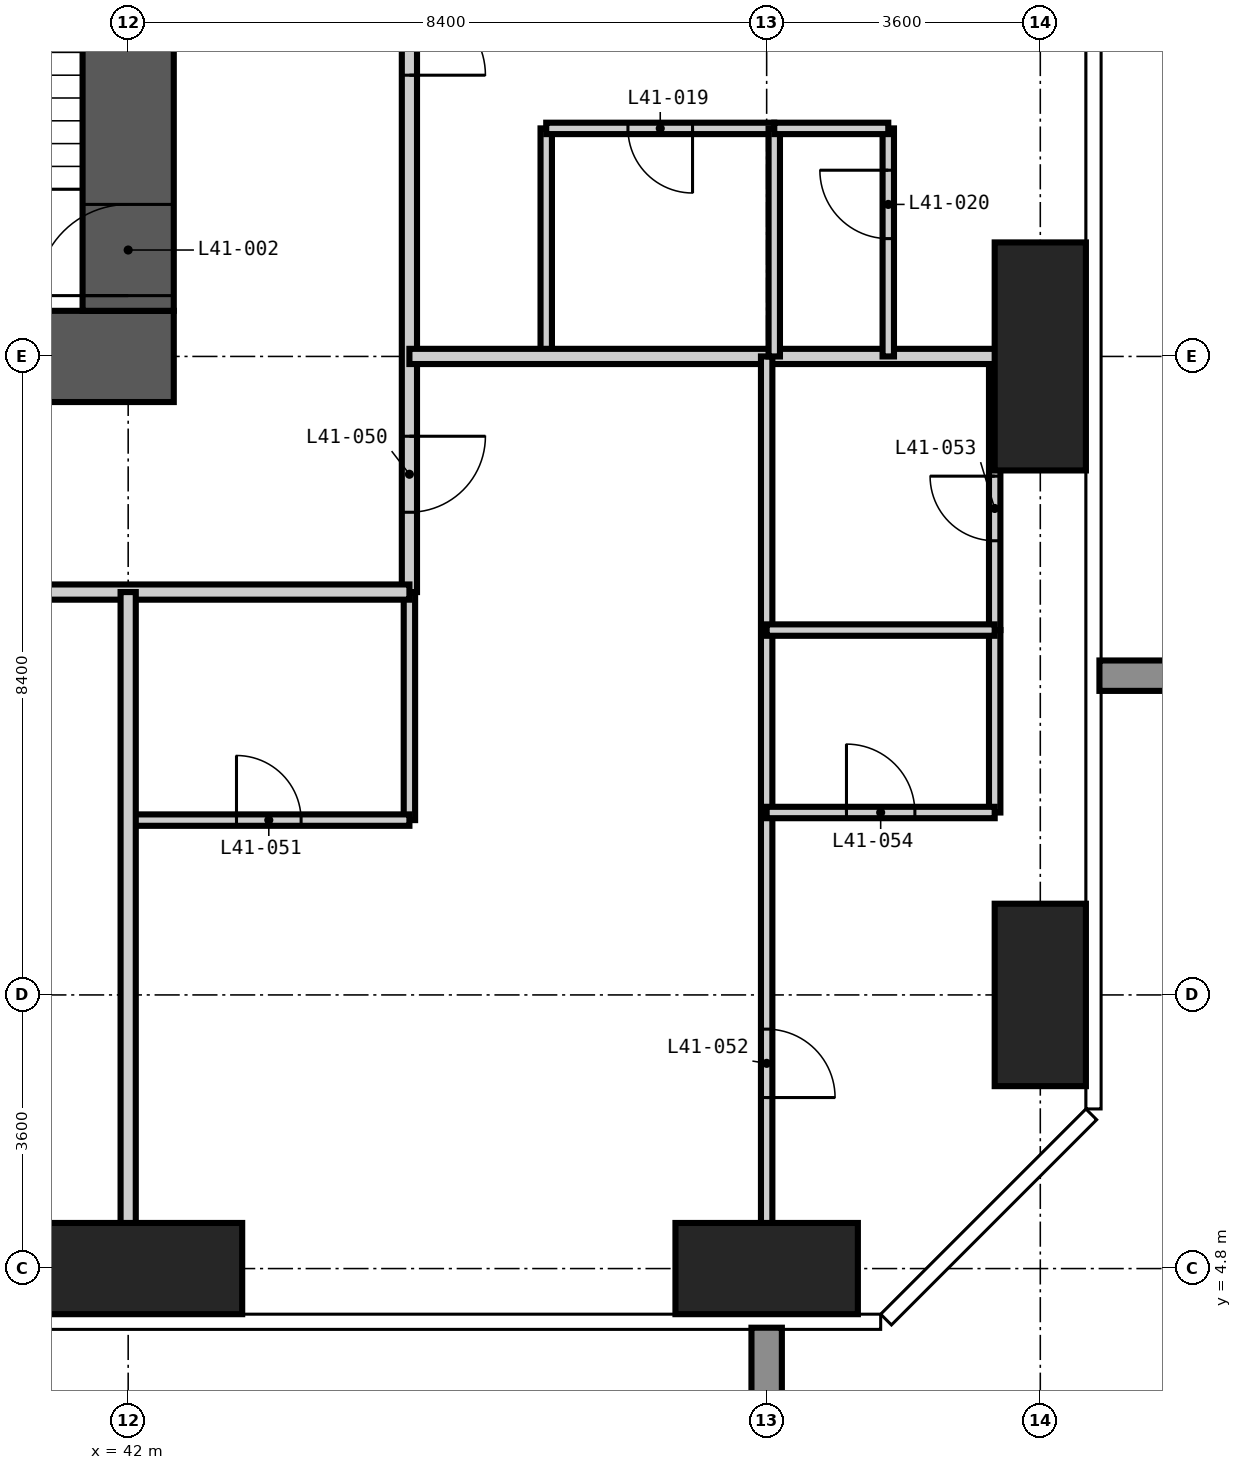
"""IFC4 building model, lengths in metres.
Left out: names, types, materials, properties, quantities, classifications, styles, units other than length and angle.
Written with IfcOpenShell. Run it as: python <this file> out.ifc"""

import sys

from ifc_helpers import new_model, si_unit, direction, frame, frame_2d, origin, origin_2d, place, context, subcontext, project, spatial, rectangle, extrude, element, fill, save


model = new_model("IFC4")
c1 = context("Model", 3, precision=1e-05, world=origin(), true_north=direction((0.0, 1.0)))
c2 = subcontext(c1, "Body", "Model", "MODEL_VIEW")
j1 = project(units=[si_unit("LENGTHUNIT", "METRE"), si_unit("PLANEANGLEUNIT", "RADIAN")], contexts=[c1])
p1 = place(None, origin())
s1 = spatial("IfcSite", under=j1, at=p1, CompositionType="ELEMENT")
p2 = place(p1, origin())
s2 = spatial("IfcBuilding", under=s1, at=p2, CompositionType="ELEMENT")
p3 = place(p2, frame((0.0, 0.0, 162.6)))
s3 = spatial("IfcBuildingStorey", under=s2, at=p3, CompositionType="ELEMENT", Elevation=162.6)
p4 = place(p3, frame((42.0, 4.8, -0.35), z_axis=(0.0, 0.0, 1.0), x_axis=(1.0, 0.0, 0.0)))
e1 = element("IfcColumn", 1, at=p4, inside=s3, PredefinedType="COLUMN", context=c2, shape_type="SweptSolid", body=[
    extrude(rectangle(XDim=3.0, YDim=1.2, at=origin_2d()), origin(), (0.0, 0.0, 1.0), 3.6),
])
p5 = place(p3, frame((50.4, 4.8, -0.35), z_axis=(0.0, 0.0, 1.0), x_axis=(1.0, 0.0, 0.0)))
e2 = element("IfcColumn", 2, at=p5, inside=s3, PredefinedType="COLUMN", context=c2, shape_type="SweptSolid", body=[
    extrude(rectangle(XDim=2.4, YDim=1.2, at=origin_2d()), origin(), (0.0, 0.0, 1.0), 3.6),
])
p6 = place(p3, frame((54.0, 8.4, -0.35), z_axis=(0.0, 0.0, 1.0), x_axis=(1.0, 0.0, 0.0)))
e3 = element("IfcColumn", 3, at=p6, inside=s3, PredefinedType="COLUMN", context=c2, shape_type="SweptSolid", body=[
    extrude(rectangle(XDim=1.2, YDim=2.4, at=origin_2d()), origin(), (0.0, 0.0, 1.0), 3.6),
])
p7 = place(p3, frame((54.0, 16.8, -0.35), z_axis=(0.0, 0.0, 1.0), x_axis=(1.0, 0.0, 0.0)))
e4 = element("IfcColumn", 4, at=p7, inside=s3, PredefinedType="COLUMN", context=c2, shape_type="SweptSolid", body=[
    extrude(rectangle(XDim=1.2, YDim=3.0, at=origin_2d()), origin(), (0.0, 0.0, 1.0), 3.6),
])
p8 = place(p3, frame((16.2, 16.8, -0.35), z_axis=(0.0, 0.0, 1.0), x_axis=(1.0, 0.0, 0.0)))
e5 = element("IfcWall", 5, at=p8, inside=s3, PredefinedType="SHEAR", context=c2, shape_type="SweptSolid", body=[
    extrude(rectangle(XDim=26.4, YDim=1.2, at=frame_2d((13.2, 0.0))), origin(), (0.0, 0.0, 1.0), 3.6),
])
p9 = place(p8, frame((12.7, 0.0, 0.35)))
e6 = element("IfcOpeningElement", 6, at=p9, cuts=e5, PredefinedType="OPENING", context=c2, shape_type="SweptSolid", body=[
    extrude(rectangle(XDim=1.0, YDim=2.1, at=frame_2d((0.5, 1.05))), frame((0.0, 0.61, 0.0), z_axis=(0.0, -1.0, 0.0), x_axis=(1.0, 0.0, 0.0)), (0.0, 0.0, 1.0), 1.22),
])
p10 = place(p8, frame((19.0, 0.0, 0.35)))
e7 = element("IfcOpeningElement", 7, at=p10, cuts=e5, PredefinedType="OPENING", context=c2, shape_type="SweptSolid", body=[
    extrude(rectangle(XDim=1.0, YDim=2.1, at=frame_2d((0.5, 1.05))), frame((0.0, 0.61, 0.0), z_axis=(0.0, -1.0, 0.0), x_axis=(1.0, 0.0, 0.0)), (0.0, 0.0, 1.0), 1.22),
])
p11 = place(p3, frame((42.0, 17.4, -0.35), z_axis=(0.0, 0.0, 1.0), x_axis=(0.0, 1.0, 0.0)))
e8 = element("IfcWall", 8, at=p11, inside=s3, PredefinedType="SHEAR", context=c2, shape_type="SweptSolid", body=[
    extrude(rectangle(XDim=24.0, YDim=1.2, at=frame_2d((12.0, 0.0))), origin(), (0.0, 0.0, 1.0), 3.6),
])
p12 = place(p11, frame((0.2, 0.0, 0.35)))
e9 = element("IfcOpeningElement", 9, at=p12, cuts=e8, PredefinedType="OPENING", context=c2, shape_type="SweptSolid", body=[
    extrude(rectangle(XDim=1.2, YDim=2.2, at=frame_2d((0.6, 1.1))), frame((0.0, 0.61, 0.0), z_axis=(0.0, -1.0, 0.0), x_axis=(1.0, 0.0, 0.0)), (0.0, 0.0, 1.0), 1.22),
])
p13 = place(p11, frame((11.5, 0.0, 0.35)))
e10 = element("IfcOpeningElement", 10, at=p13, cuts=e8, PredefinedType="OPENING", context=c2, shape_type="SweptSolid", body=[
    extrude(rectangle(XDim=1.0, YDim=2.1, at=frame_2d((0.5, 1.05))), frame((0.0, 0.61, 0.0), z_axis=(0.0, -1.0, 0.0), x_axis=(1.0, 0.0, 0.0)), (0.0, 0.0, 1.0), 1.22),
])
p14 = place(p11, frame((19.9, 0.0, 0.35)))
e11 = element("IfcOpeningElement", 11, at=p14, cuts=e8, PredefinedType="OPENING", context=c2, shape_type="SweptSolid", body=[
    extrude(rectangle(XDim=1.0, YDim=2.1, at=frame_2d((0.5, 1.05))), frame((0.0, 0.61, 0.0), z_axis=(0.0, -1.0, 0.0), x_axis=(1.0, 0.0, 0.0)), (0.0, 0.0, 1.0), 1.22),
])
for number, where, z_axis, x_axis in (
    (12, (45.7, 10.7, 0.0), (0.0, 0.0, 1.0), (0.0, 1.0, 0.0)),
    (13, (47.5, 16.8, 0.0), (0.0, 0.0, 1.0), (0.0, 1.0, 0.0)),
):
    element("IfcWall", number, at=place(p3, frame(where, z_axis=z_axis, x_axis=x_axis)), inside=s3, PredefinedType="PARTITIONING", context=c2, shape_type="SweptSolid", body=[
        extrude(rectangle(XDim=3.0, YDim=0.15, at=frame_2d((1.5, 0.0))), origin(), (0.0, 0.0, 1.0), 3.25),
    ])
p15 = place(p3, frame((53.4, 13.2, 0.0), z_axis=(0.0, 0.0, 1.0), x_axis=(0.0, 1.0, 0.0)))
e14 = element("IfcWall", 14, at=p15, inside=s3, PredefinedType="PARTITIONING", context=c2, shape_type="SweptSolid", body=[
    extrude(rectangle(XDim=3.6, YDim=0.15, at=frame_2d((1.8, 0.0))), origin(), (0.0, 0.0, 1.0), 3.25),
])
p16 = place(p15, frame((1.175, 0.0, 0.0)))
e15 = element("IfcOpeningElement", 15, at=p16, cuts=e14, PredefinedType="OPENING", context=c2, shape_type="SweptSolid", body=[
    extrude(rectangle(XDim=0.85, YDim=2.1, at=frame_2d((0.425, 1.05))), frame((0.0, 0.085, 0.0), z_axis=(0.0, -1.0, 0.0), x_axis=(1.0, 0.0, 0.0)), (0.0, 0.0, 1.0), 0.17),
])
p17 = place(p3, frame((42.0, 10.7, 0.0), z_axis=(0.0, 0.0, 1.0), x_axis=(1.0, 0.0, 0.0)))
e16 = element("IfcWall", 16, at=p17, inside=s3, PredefinedType="PARTITIONING", context=c2, shape_type="SweptSolid", body=[
    extrude(rectangle(XDim=3.7, YDim=0.15, at=frame_2d((1.85, 0.0))), origin(), (0.0, 0.0, 1.0), 3.25),
])
p18 = place(p17, frame((1.425, 0.0, 0.0)))
e17 = element("IfcOpeningElement", 17, at=p18, cuts=e16, PredefinedType="OPENING", context=c2, shape_type="SweptSolid", body=[
    extrude(rectangle(XDim=0.85, YDim=2.1, at=frame_2d((0.425, 1.05))), frame((0.0, 0.085, 0.0), z_axis=(0.0, -1.0, 0.0), x_axis=(1.0, 0.0, 0.0)), (0.0, 0.0, 1.0), 0.17),
])
p19 = place(p3, frame((47.5, 19.8, 0.0), z_axis=(0.0, 0.0, 1.0), x_axis=(1.0, 0.0, 0.0)))
e18 = element("IfcWall", 18, at=p19, inside=s3, PredefinedType="PARTITIONING", context=c2, shape_type="SweptSolid", body=[
    extrude(rectangle(XDim=3.0, YDim=0.15, at=frame_2d((1.5, 0.0))), origin(), (0.0, 0.0, 1.0), 3.25),
])
p20 = place(p19, frame((1.075, 0.0, 0.0)))
e19 = element("IfcOpeningElement", 19, at=p20, cuts=e18, PredefinedType="OPENING", context=c2, shape_type="SweptSolid", body=[
    extrude(rectangle(XDim=0.85, YDim=2.1, at=frame_2d((0.425, 1.05))), frame((0.0, 0.085, 0.0), z_axis=(0.0, -1.0, 0.0), x_axis=(1.0, 0.0, 0.0)), (0.0, 0.0, 1.0), 0.17),
])
p21 = place(p3, frame((45.7, 44.5, 0.0), z_axis=(0.0, 0.0, 1.0), x_axis=(0.0, -1.0, 0.0)))
e20 = element("IfcWall", 20, at=p21, inside=s3, PredefinedType="PARTITIONING", context=c2, shape_type="SweptSolid", body=[
    extrude(rectangle(XDim=30.8, YDim=0.2, at=frame_2d((15.4, 0.0))), origin(), (0.0, 0.0, 1.0), 3.25),
])
p22 = place(p21, frame((23.0, 0.0, 0.0)))
e21 = element("IfcOpeningElement", 21, at=p22, cuts=e20, PredefinedType="OPENING", context=c2, shape_type="SweptSolid", body=[
    extrude(rectangle(XDim=1.0, YDim=2.2, at=frame_2d((0.5, 1.1))), frame((0.0, 0.11, 0.0), z_axis=(0.0, -1.0, 0.0), x_axis=(1.0, 0.0, 0.0)), (0.0, 0.0, 1.0), 0.22),
])
p23 = place(p21, frame((14.6, 0.0, 0.0)))
e22 = element("IfcOpeningElement", 22, at=p23, cuts=e20, PredefinedType="OPENING", context=c2, shape_type="SweptSolid", body=[
    extrude(rectangle(XDim=1.0, YDim=2.2, at=frame_2d((0.5, 1.1))), frame((0.0, 0.11, 0.0), z_axis=(0.0, -1.0, 0.0), x_axis=(1.0, 0.0, 0.0)), (0.0, 0.0, 1.0), 0.22),
])
p24 = place(p21, frame((6.2, 0.0, 0.0)))
e23 = element("IfcOpeningElement", 23, at=p24, cuts=e20, PredefinedType="OPENING", context=c2, shape_type="SweptSolid", body=[
    extrude(rectangle(XDim=1.0, YDim=2.2, at=frame_2d((0.5, 1.1))), frame((0.0, 0.11, 0.0), z_axis=(0.0, -1.0, 0.0), x_axis=(1.0, 0.0, 0.0)), (0.0, 0.0, 1.0), 0.22),
])
p25 = place(p21, frame((28.75, 0.0, 0.0)))
e24 = element("IfcOpeningElement", 24, at=p25, cuts=e20, PredefinedType="OPENING", context=c2, shape_type="SweptSolid", body=[
    extrude(rectangle(XDim=1.0, YDim=2.2, at=frame_2d((0.5, 1.1))), frame((0.0, 0.11, 0.0), z_axis=(0.0, -1.0, 0.0), x_axis=(1.0, 0.0, 0.0)), (0.0, 0.0, 1.0), 0.22),
])
p26 = place(p21, frame((0.75, 0.0, 0.0)))
e25 = element("IfcOpeningElement", 25, at=p26, cuts=e20, PredefinedType="OPENING", context=c2, shape_type="SweptSolid", body=[
    extrude(rectangle(XDim=1.0, YDim=2.2, at=frame_2d((0.5, 1.1))), frame((0.0, 0.11, 0.0), z_axis=(0.0, -1.0, 0.0), x_axis=(1.0, 0.0, 0.0)), (0.0, 0.0, 1.0), 0.22),
])
p27 = place(p3, frame((45.7, 13.7, 0.0), z_axis=(0.0, 0.0, 1.0), x_axis=(-1.0, 0.0, 0.0)))
e26 = element("IfcWall", 26, at=p27, inside=s3, PredefinedType="PARTITIONING", context=c2, shape_type="SweptSolid", body=[
    extrude(rectangle(XDim=32.0, YDim=0.2, at=frame_2d((16.0, 0.0))), origin(), (0.0, 0.0, 1.0), 3.25),
])
p28 = place(p27, frame((24.2, 0.0, 0.0)))
e27 = element("IfcOpeningElement", 27, at=p28, cuts=e26, PredefinedType="OPENING", context=c2, shape_type="SweptSolid", body=[
    extrude(rectangle(XDim=1.0, YDim=2.2, at=frame_2d((0.5, 1.1))), frame((0.0, 0.11, 0.0), z_axis=(0.0, -1.0, 0.0), x_axis=(1.0, 0.0, 0.0)), (0.0, 0.0, 1.0), 0.22),
])
p29 = place(p27, frame((15.8, 0.0, 0.0)))
e28 = element("IfcOpeningElement", 28, at=p29, cuts=e26, PredefinedType="OPENING", context=c2, shape_type="SweptSolid", body=[
    extrude(rectangle(XDim=1.0, YDim=2.2, at=frame_2d((0.5, 1.1))), frame((0.0, 0.11, 0.0), z_axis=(0.0, -1.0, 0.0), x_axis=(1.0, 0.0, 0.0)), (0.0, 0.0, 1.0), 0.22),
])
p30 = place(p27, frame((7.4, 0.0, 0.0)))
e29 = element("IfcOpeningElement", 29, at=p30, cuts=e26, PredefinedType="OPENING", context=c2, shape_type="SweptSolid", body=[
    extrude(rectangle(XDim=1.0, YDim=2.2, at=frame_2d((0.5, 1.1))), frame((0.0, 0.11, 0.0), z_axis=(0.0, -1.0, 0.0), x_axis=(1.0, 0.0, 0.0)), (0.0, 0.0, 1.0), 0.22),
])
p31 = place(p3, frame((42.0, 4.182, 0.0), z_axis=(0.0, 0.0, 1.0), x_axis=(0.0, 1.0, 0.0)))
e30 = element("IfcWall", 30, at=p31, inside=s3, PredefinedType="PARTITIONING", context=c2, shape_type="SweptSolid", body=[
    extrude(rectangle(XDim=9.518, YDim=0.2, at=frame_2d((4.759, 0.0))), origin(), (0.0, 0.0, 1.0), 3.25),
])
p32 = place(p3, frame((45.7, 16.8, 0.0), z_axis=(0.0, 0.0, 1.0), x_axis=(1.0, 0.0, 0.0)))
e31 = element("IfcWall", 31, at=p32, inside=s3, PredefinedType="PARTITIONING", context=c2, shape_type="SweptSolid", body=[
    extrude(rectangle(XDim=8.918, YDim=0.2, at=frame_2d((4.459, 0.0))), origin(), (0.0, 0.0, 1.0), 3.25),
])
p33 = place(p3, frame((50.4, 4.182, 0.0), z_axis=(0.0, 0.0, 1.0), x_axis=(0.0, 1.0, 0.0)))
e32 = element("IfcWall", 32, at=p33, inside=s3, PredefinedType="PARTITIONING", context=c2, shape_type="SweptSolid", body=[
    extrude(rectangle(XDim=12.618, YDim=0.15, at=frame_2d((6.309, 0.0))), origin(), (0.0, 0.0, 1.0), 3.25),
])
p34 = place(p33, frame((2.868, 0.0, 0.0)))
e33 = element("IfcOpeningElement", 33, at=p34, cuts=e32, PredefinedType="OPENING", context=c2, shape_type="SweptSolid", body=[
    extrude(rectangle(XDim=0.9, YDim=2.1, at=frame_2d((0.45, 1.05))), frame((0.0, 0.085, 0.0), z_axis=(0.0, -1.0, 0.0), x_axis=(1.0, 0.0, 0.0)), (0.0, 0.0, 1.0), 0.17),
])
p35 = place(p3, frame((50.5, 16.8, 0.0), z_axis=(0.0, 0.0, 1.0), x_axis=(0.0, 1.0, 0.0)))
e34 = element("IfcWall", 34, at=p35, inside=s3, PredefinedType="PARTITIONING", context=c2, shape_type="SweptSolid", body=[
    extrude(rectangle(XDim=3.0, YDim=0.15, at=frame_2d((1.5, 0.0))), origin(), (0.0, 0.0, 1.0), 3.25),
])
p36 = place(p3, frame((52.0, 16.8, 0.0), z_axis=(0.0, 0.0, 1.0), x_axis=(0.0, 1.0, 0.0)))
e35 = element("IfcWall", 35, at=p36, inside=s3, PredefinedType="PARTITIONING", context=c2, shape_type="SweptSolid", body=[
    extrude(rectangle(XDim=3.0, YDim=0.15, at=frame_2d((1.5, 0.0))), origin(), (0.0, 0.0, 1.0), 3.25),
])
p37 = place(p36, frame((1.55, 0.0, 0.0)))
e36 = element("IfcOpeningElement", 36, at=p37, cuts=e35, PredefinedType="OPENING", context=c2, shape_type="SweptSolid", body=[
    extrude(rectangle(XDim=0.9, YDim=2.1, at=frame_2d((0.45, 1.05))), frame((0.0, 0.085, 0.0), z_axis=(0.0, -1.0, 0.0), x_axis=(1.0, 0.0, 0.0)), (0.0, 0.0, 1.0), 0.17),
])
p38 = place(p3, frame((53.4, 10.8, 0.0), z_axis=(0.0, 0.0, 1.0), x_axis=(0.0, 1.0, 0.0)))
e37 = element("IfcWall", 37, at=p38, inside=s3, PredefinedType="PARTITIONING", context=c2, shape_type="SweptSolid", body=[
    extrude(rectangle(XDim=2.4, YDim=0.15, at=frame_2d((1.2, 0.0))), origin(), (0.0, 0.0, 1.0), 3.25),
])
p39 = place(p3, frame((50.4, 10.8, 0.0), z_axis=(0.0, 0.0, 1.0), x_axis=(1.0, 0.0, 0.0)))
e38 = element("IfcWall", 38, at=p39, inside=s3, PredefinedType="PARTITIONING", context=c2, shape_type="SweptSolid", body=[
    extrude(rectangle(XDim=3.0, YDim=0.15, at=frame_2d((1.5, 0.0))), origin(), (0.0, 0.0, 1.0), 3.25),
])
p40 = place(p39, frame((1.05, 0.0, 0.0)))
e39 = element("IfcOpeningElement", 39, at=p40, cuts=e38, PredefinedType="OPENING", context=c2, shape_type="SweptSolid", body=[
    extrude(rectangle(XDim=0.9, YDim=2.1, at=frame_2d((0.45, 1.05))), frame((0.0, 0.085, 0.0), z_axis=(0.0, -1.0, 0.0), x_axis=(1.0, 0.0, 0.0)), (0.0, 0.0, 1.0), 0.17),
])
p41 = place(p3, frame((50.4, 13.2, 0.0), z_axis=(0.0, 0.0, 1.0), x_axis=(1.0, 0.0, 0.0)))
e40 = element("IfcWall", 40, at=p41, inside=s3, PredefinedType="PARTITIONING", context=c2, shape_type="SweptSolid", body=[
    extrude(rectangle(XDim=3.0, YDim=0.15, at=frame_2d((1.5, 0.0))), origin(), (0.0, 0.0, 1.0), 3.25),
])
p42 = place(p3, frame((50.5, 19.8, 0.0), z_axis=(0.0, 0.0, 1.0), x_axis=(1.0, 0.0, 0.0)))
e41 = element("IfcWall", 41, at=p42, inside=s3, PredefinedType="PARTITIONING", context=c2, shape_type="SweptSolid", body=[
    extrude(rectangle(XDim=1.5, YDim=0.15, at=frame_2d((0.75, 0.0))), origin(), (0.0, 0.0, 1.0), 3.25),
])
p43 = place(p12, origin())
e42 = element("IfcDoor", 42, at=p43, inside=s3, OperationType="SINGLE_SWING_LEFT", PredefinedType="DOOR", context=c2, shape_type="SweptSolid", body=[
    extrude(rectangle(XDim=1.2, YDim=2.2, at=frame_2d((0.6, 1.1))), frame((0.0, 0.025, 0.0), z_axis=(0.0, -1.0, 0.0), x_axis=(1.0, 0.0, 0.0)), (0.0, 0.0, 1.0), 0.05),
])
fill(e9, e42)
p44 = place(p22, origin())
e43 = element("IfcDoor", 43, at=p44, inside=s3, OperationType="SINGLE_SWING_RIGHT", PredefinedType="DOOR", context=c2, shape_type="SweptSolid", body=[
    extrude(rectangle(XDim=1.0, YDim=2.2, at=frame_2d((0.5, 1.1))), frame((0.0, 0.025, 0.0), z_axis=(0.0, -1.0, 0.0), x_axis=(1.0, 0.0, 0.0)), (0.0, 0.0, 1.0), 0.05),
])
fill(e21, e43)
p45 = place(p20, frame((0.85, 0.0, 0.0), z_axis=(0.0, 0.0, 1.0), x_axis=(-1.0, 0.0, 0.0)))
e44 = element("IfcDoor", 44, at=p45, inside=s3, OperationType="SINGLE_SWING_LEFT", PredefinedType="DOOR", context=c2, shape_type="SweptSolid", body=[
    extrude(rectangle(XDim=0.85, YDim=2.1, at=frame_2d((0.425, 1.05))), frame((0.0, 0.025, 0.0), z_axis=(0.0, -1.0, 0.0), x_axis=(1.0, 0.0, 0.0)), (0.0, 0.0, 1.0), 0.05),
])
fill(e19, e44)
p46 = place(p37, origin())
e45 = element("IfcDoor", 45, at=p46, inside=s3, OperationType="SINGLE_SWING_RIGHT", PredefinedType="DOOR", context=c2, shape_type="SweptSolid", body=[
    extrude(rectangle(XDim=0.9, YDim=2.1, at=frame_2d((0.45, 1.05))), frame((0.0, 0.025, 0.0), z_axis=(0.0, -1.0, 0.0), x_axis=(1.0, 0.0, 0.0)), (0.0, 0.0, 1.0), 0.05),
])
fill(e36, e45)
p47 = place(p25, origin())
e46 = element("IfcDoor", 46, at=p47, inside=s3, OperationType="SINGLE_SWING_LEFT", PredefinedType="DOOR", context=c2, shape_type="SweptSolid", body=[
    extrude(rectangle(XDim=1.0, YDim=2.2, at=frame_2d((0.5, 1.1))), frame((0.0, 0.025, 0.0), z_axis=(0.0, -1.0, 0.0), x_axis=(1.0, 0.0, 0.0)), (0.0, 0.0, 1.0), 0.05),
])
fill(e24, e46)
p48 = place(p18, origin())
e47 = element("IfcDoor", 47, at=p48, inside=s3, OperationType="SINGLE_SWING_LEFT", PredefinedType="DOOR", context=c2, shape_type="SweptSolid", body=[
    extrude(rectangle(XDim=0.85, YDim=2.1, at=frame_2d((0.425, 1.05))), frame((0.0, 0.025, 0.0), z_axis=(0.0, -1.0, 0.0), x_axis=(1.0, 0.0, 0.0)), (0.0, 0.0, 1.0), 0.05),
])
fill(e17, e47)
p49 = place(p34, frame((0.9, 0.0, 0.0), z_axis=(0.0, 0.0, 1.0), x_axis=(-1.0, 0.0, 0.0)))
e48 = element("IfcDoor", 48, at=p49, inside=s3, OperationType="SINGLE_SWING_RIGHT", PredefinedType="DOOR", context=c2, shape_type="SweptSolid", body=[
    extrude(rectangle(XDim=0.9, YDim=2.1, at=frame_2d((0.45, 1.05))), frame((0.0, 0.025, 0.0), z_axis=(0.0, -1.0, 0.0), x_axis=(1.0, 0.0, 0.0)), (0.0, 0.0, 1.0), 0.05),
])
fill(e33, e48)
p50 = place(p16, origin())
e49 = element("IfcDoor", 49, at=p50, inside=s3, OperationType="SINGLE_SWING_RIGHT", PredefinedType="DOOR", context=c2, shape_type="SweptSolid", body=[
    extrude(rectangle(XDim=0.85, YDim=2.1, at=frame_2d((0.425, 1.05))), frame((0.0, 0.025, 0.0), z_axis=(0.0, -1.0, 0.0), x_axis=(1.0, 0.0, 0.0)), (0.0, 0.0, 1.0), 0.05),
])
fill(e15, e49)
p51 = place(p40, origin())
e50 = element("IfcDoor", 50, at=p51, inside=s3, OperationType="SINGLE_SWING_LEFT", PredefinedType="DOOR", context=c2, shape_type="SweptSolid", body=[
    extrude(rectangle(XDim=0.9, YDim=2.1, at=frame_2d((0.45, 1.05))), frame((0.0, 0.025, 0.0), z_axis=(0.0, -1.0, 0.0), x_axis=(1.0, 0.0, 0.0)), (0.0, 0.0, 1.0), 0.05),
])
fill(e39, e50)
save(model, sys.argv[1])
